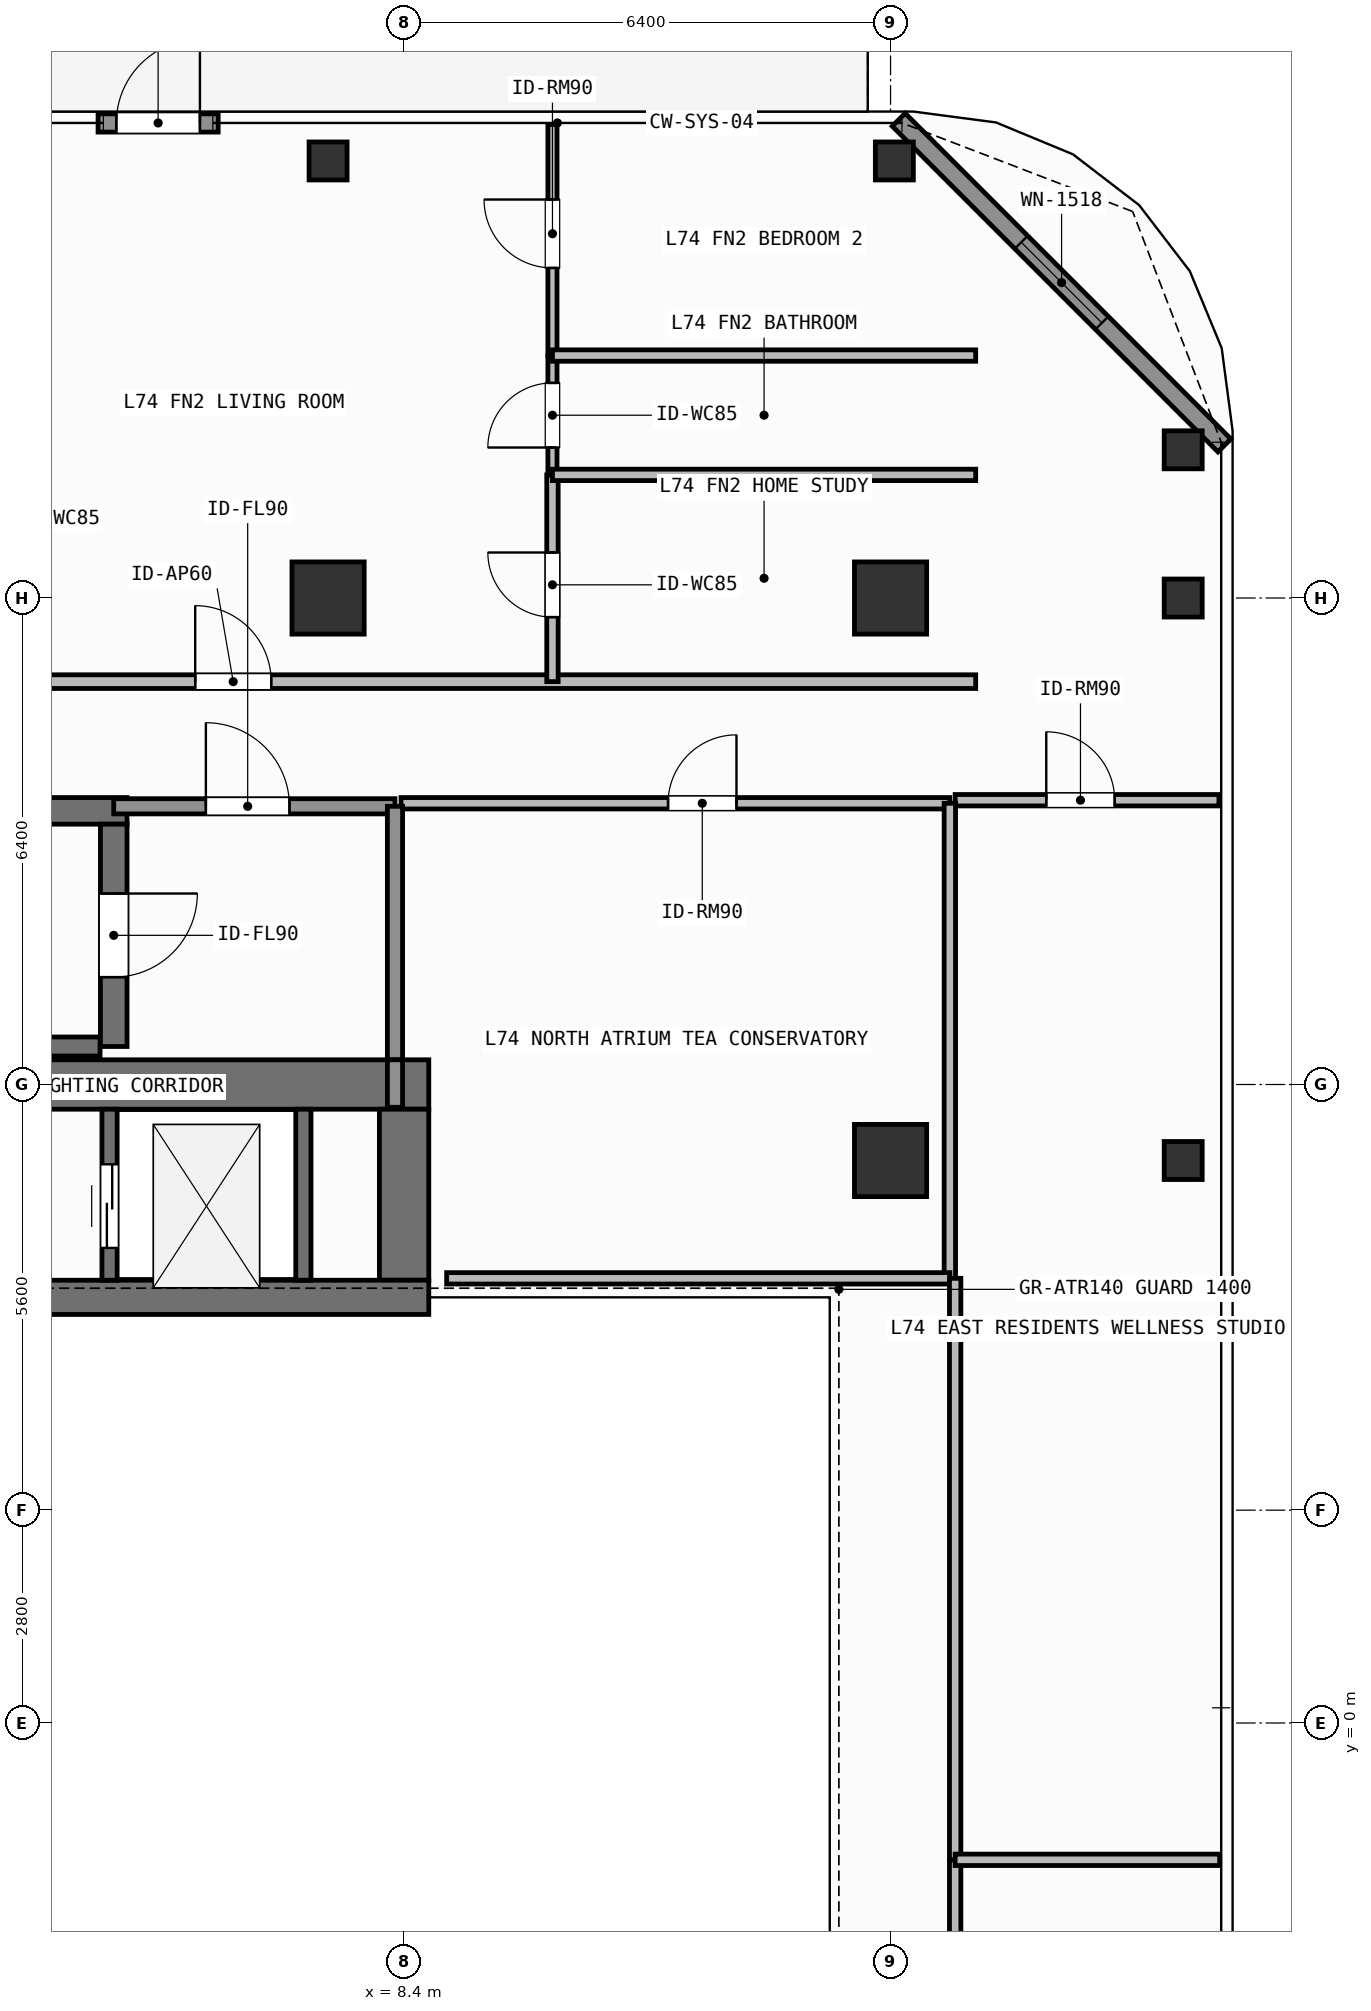
"""IFC4 building model, lengths in metres.
Left out: names, types, materials, properties, quantities, classifications, styles, units other than length and angle.
Written with IfcOpenShell. Run it as: python <this file> out.ifc"""

import sys

from ifc_helpers import new_model, si_unit, direction, frame, frame_2d, origin, origin_2d, place, context, subcontext, project, spatial, rectangle, hollow_rectangle, extrude, element, fill, save


model = new_model("IFC4")
c1 = context("Model", 3, precision=1e-05, world=origin(), true_north=direction((0.0, 1.0)))
c2 = subcontext(c1, "Body", "Model", "MODEL_VIEW")
j1 = project(units=[si_unit("LENGTHUNIT", "METRE"), si_unit("PLANEANGLEUNIT", "RADIAN")], contexts=[c1])
p1 = place(None, origin())
s1 = spatial("IfcSite", under=j1, at=p1, CompositionType="ELEMENT")
p2 = place(p1, origin())
s2 = spatial("IfcBuilding", under=s1, at=p2, CompositionType="ELEMENT")
p3 = place(p2, frame((0.0, 0.0, 301.5)))
s3 = spatial("IfcBuildingStorey", under=s2, at=p3, CompositionType="ELEMENT", Elevation=301.5)
p4 = place(p3, frame((-7.55, 8.4, 0.0), z_axis=(0.0, 0.0, 1.0), x_axis=(1.0, 0.0, 0.0)))
e1 = element("IfcWall", 1, at=p4, inside=s3, PredefinedType="SHEAR", context=c2, shape_type="SweptSolid", body=[
    extrude(rectangle(XDim=16.275, YDim=0.65, at=frame_2d((8.138, 0.0))), origin(), (0.0, 0.0, 1.0), 3.9),
])
p5 = place(p3, frame((8.4, 5.825, 0.0), z_axis=(0.0, 0.0, 1.0), x_axis=(0.0, 1.0, 0.0)))
e2 = element("IfcWall", 2, at=p5, inside=s3, PredefinedType="SHEAR", context=c2, shape_type="SweptSolid", body=[
    extrude(rectangle(XDim=2.25, YDim=0.65, at=frame_2d((1.125, 0.0))), origin(), (0.0, 0.0, 1.0), 3.9),
])
p6 = place(p3, frame((3.045, 5.6, 0.0), z_axis=(0.0, 0.0, 1.0), x_axis=(1.0, 0.0, 0.0)))
e3 = element("IfcWall", 3, at=p6, inside=s3, PredefinedType="SHEAR", context=c2, shape_type="SweptSolid", body=[
    extrude(rectangle(XDim=5.68, YDim=0.45, at=frame_2d((2.84, 0.0))), origin(), (0.0, 0.0, 1.0), 3.9),
])
p7 = place(p3, frame((-2.555, 12.0, 0.0), z_axis=(0.0, 0.0, 1.0), x_axis=(1.0, 0.0, 0.0)))
e4 = element("IfcWall", 4, at=p7, inside=s3, PredefinedType="SHEAR", context=c2, shape_type="SweptSolid", body=[
    extrude(rectangle(XDim=7.31, YDim=0.35, at=frame_2d((3.655, 0.0))), origin(), (0.0, 0.0, 1.0), 3.9),
])
p8 = place(p3, frame((-2.2, 8.9, 0.0), z_axis=(0.0, 0.0, 1.0), x_axis=(1.0, 0.0, 0.0)))
e5 = element("IfcWall", 5, at=p8, inside=s3, PredefinedType="SHEAR", context=c2, shape_type="SweptSolid", body=[
    extrude(rectangle(XDim=6.6, YDim=0.25, at=frame_2d((3.3, 0.0))), origin(), (0.0, 0.0, 1.0), 3.9),
])
p9 = place(p3, frame((4.58, 11.825, 0.0), z_axis=(0.0, 0.0, 1.0), x_axis=(0.0, -1.0, 0.0)))
e6 = element("IfcWall", 6, at=p9, inside=s3, PredefinedType="SHEAR", context=c2, shape_type="SweptSolid", body=[
    extrude(rectangle(XDim=2.925, YDim=0.35, at=frame_2d((1.462, 0.0))), origin(), (0.0, 0.0, 1.0), 3.9),
])
p10 = place(p9, frame((0.913, 0.0, 0.0)))
e7 = element("IfcOpeningElement", 7, at=p10, cuts=e6, PredefinedType="OPENING", context=c2, shape_type="SweptSolid", body=[
    extrude(rectangle(XDim=1.1, YDim=2.15, at=frame_2d((0.55, 1.075))), frame((0.0, 0.185, 0.0), z_axis=(0.0, -1.0, 0.0), x_axis=(1.0, 0.0, 0.0)), (0.0, 0.0, 1.0), 0.37),
])
for number, where, z_axis, x_axis in (
    (8, (7.4, 14.8, 0.0), (0.0, 0.0, 1.0), (1.0, 0.0, 0.0)),
    (9, (14.8, 14.8, 0.0), (0.0, 0.0, 1.0), (1.0, 0.0, 0.0)),
    (10, (14.8, 7.4, 0.0), (0.0, 0.0, 1.0), (1.0, 0.0, 0.0)),
):
    element("IfcColumn", number, at=place(p3, frame(where, z_axis=z_axis, x_axis=x_axis)), inside=s3, PredefinedType="COLUMN", context=c2, shape_type="SweptSolid", body=[
        extrude(rectangle(XDim=0.95, YDim=0.95, at=origin_2d()), origin(), (0.0, 0.0, 1.0), 3.9),
    ])
for number, where, z_axis, x_axis in (
    (11, (14.85, 20.55, 0.0), (0.0, 0.0, 1.0), (1.0, 0.0, 0.0)),
    (12, (18.65, 16.75, 0.0), (0.0, 0.0, 1.0), (1.0, 0.0, 0.0)),
    (13, (7.4, 20.55, 0.0), (0.0, 0.0, 1.0), (1.0, 0.0, 0.0)),
    (14, (18.65, 7.4, 0.0), (0.0, 0.0, 1.0), (1.0, 0.0, 0.0)),
    (15, (18.65, 14.8, 0.0), (0.0, 0.0, 1.0), (1.0, 0.0, 0.0)),
):
    element("IfcColumn", number, at=place(p3, frame(where, z_axis=z_axis, x_axis=x_axis)), inside=s3, PredefinedType="COLUMN", context=c2, shape_type="SweptSolid", body=[
        extrude(hollow_rectangle(XDim=0.5, YDim=0.5, WallThickness=0.025, at=origin_2d()), origin(), (0.0, 0.0, 1.0), 3.9),
    ])
p11 = place(p3, frame((4.374, 21.05, 0.0), z_axis=(0.0, 0.0, 1.0), x_axis=(1.0, 0.0, 0.0)))
e16 = element("IfcWall", 16, at=p11, inside=s3, PredefinedType="SOLIDWALL", context=c2, shape_type="SweptSolid", body=[
    extrude(rectangle(XDim=1.58, YDim=0.24, at=frame_2d((0.79, 0.0))), origin(), (0.0, 0.0, 1.0), 3.68),
])
p12 = place(p11, frame((0.24, 0.0, 0.0)))
e17 = element("IfcOpeningElement", 17, at=p12, cuts=e16, PredefinedType="OPENING", context=c2, shape_type="SweptSolid", body=[
    extrude(rectangle(XDim=1.1, YDim=2.2, at=frame_2d((0.55, 1.1))), frame((0.0, 0.13, 0.0), z_axis=(0.0, -1.0, 0.0), x_axis=(1.0, 0.0, 0.0)), (0.0, 0.0, 1.0), 0.26),
])
p13 = place(p3, frame((14.908, 21.092, 0.0), z_axis=(0.0, 0.0, 1.0), x_axis=(0.707106781187, -0.707106781187, 0.0)))
e18 = element("IfcWall", 18, at=p13, inside=s3, PredefinedType="SOLIDWALL", context=c2, shape_type="SweptSolid", body=[
    extrude(rectangle(XDim=6.059, YDim=0.24, at=frame_2d((3.03, 0.0))), origin(), (0.0, 0.0, 1.0), 3.68),
])
p14 = place(p13, frame((2.28, 0.0, 0.8)))
e19 = element("IfcOpeningElement", 19, at=p14, cuts=e18, PredefinedType="OPENING", context=c2, shape_type="SweptSolid", body=[
    extrude(rectangle(XDim=1.5, YDim=1.85, at=frame_2d((0.75, 0.925))), frame((0.0, 0.13, 0.0), z_axis=(0.0, -1.0, 0.0), x_axis=(1.0, 0.0, 0.0)), (0.0, 0.0, 1.0), 0.26),
])
p15 = place(p3, frame((4.525, 5.825, 0.0), z_axis=(0.0, 0.0, 1.0), x_axis=(0.0, 1.0, 0.0)))
e20 = element("IfcWall", 20, at=p15, inside=s3, PredefinedType="SHEAR", context=c2, shape_type="SweptSolid", body=[
    extrude(rectangle(XDim=2.25, YDim=0.2, at=frame_2d((1.125, 0.0))), origin(), (0.0, 0.0, 1.0), 3.68),
])
p16 = place(p15, frame((0.425, 0.0, 0.0)))
e21 = element("IfcOpeningElement", 21, at=p16, cuts=e20, PredefinedType="OPENING", context=c2, shape_type="SweptSolid", body=[
    extrude(rectangle(XDim=1.1, YDim=2.2, at=frame_2d((0.55, 1.1))), frame((0.0, 0.11, 0.0), z_axis=(0.0, -1.0, 0.0), x_axis=(1.0, 0.0, 0.0)), (0.0, 0.0, 1.0), 0.22),
])
p17 = place(p3, frame((7.075, 5.825, 0.0), z_axis=(0.0, 0.0, 1.0), x_axis=(0.0, 1.0, 0.0)))
e22 = element("IfcWall", 22, at=p17, inside=s3, PredefinedType="SHEAR", context=c2, shape_type="SweptSolid", body=[
    extrude(rectangle(XDim=2.25, YDim=0.2, at=frame_2d((1.125, 0.0))), origin(), (0.0, 0.0, 1.0), 3.68),
])
p18 = place(p3, frame((4.58, 12.06, 0.0), z_axis=(0.0, 0.0, 1.0), x_axis=(1.0, 0.0, 0.0)))
e23 = element("IfcWall", 23, at=p18, inside=s3, PredefinedType="SOLIDWALL", context=c2, shape_type="SweptSolid", body=[
    extrude(rectangle(XDim=3.7, YDim=0.2, at=frame_2d((1.85, 0.0))), origin(), (0.0, 0.0, 1.0), 3.68),
])
p19 = place(p18, frame((1.212, 0.0, 0.0)))
e24 = element("IfcOpeningElement", 24, at=p19, cuts=e23, PredefinedType="OPENING", context=c2, shape_type="SweptSolid", body=[
    extrude(rectangle(XDim=1.1, YDim=2.15, at=frame_2d((0.55, 1.075))), frame((0.0, 0.11, 0.0), z_axis=(0.0, -1.0, 0.0), x_axis=(1.0, 0.0, 0.0)), (0.0, 0.0, 1.0), 0.22),
])
p20 = place(p3, frame((8.36, 12.1, 0.0), z_axis=(0.0, 0.0, 1.0), x_axis=(1.0, 0.0, 0.0)))
e25 = element("IfcWall", 25, at=p20, inside=s3, PredefinedType="PARTITIONING", context=c2, shape_type="SweptSolid", body=[
    extrude(rectangle(XDim=7.22, YDim=0.15, at=frame_2d((3.61, 0.0))), origin(), (0.0, 0.0, 1.0), 3.68),
])
p21 = place(p20, frame((3.513, 0.0, 0.0)))
e26 = element("IfcOpeningElement", 26, at=p21, cuts=e25, PredefinedType="OPENING", context=c2, shape_type="SweptSolid", body=[
    extrude(rectangle(XDim=0.9, YDim=2.1, at=frame_2d((0.45, 1.05))), frame((0.0, 0.085, 0.0), z_axis=(0.0, -1.0, 0.0), x_axis=(1.0, 0.0, 0.0)), (0.0, 0.0, 1.0), 0.17),
])
p22 = place(p3, frame((-5.224, 13.7, 0.0), z_axis=(0.0, 0.0, 1.0), x_axis=(1.0, 0.0, 0.0)))
e27 = element("IfcWall", 27, at=p22, inside=s3, PredefinedType="PARTITIONING", context=c2, shape_type="SweptSolid", body=[
    extrude(rectangle(XDim=21.144, YDim=0.18, at=frame_2d((10.572, 0.0))), origin(), (0.0, 0.0, 1.0), 3.68),
])
p23 = place(p22, frame((10.876, 0.0, 0.0)))
e28 = element("IfcOpeningElement", 28, at=p23, cuts=e27, PredefinedType="OPENING", context=c2, shape_type="SweptSolid", body=[
    extrude(rectangle(XDim=1.0, YDim=2.2, at=frame_2d((0.5, 1.1))), frame((0.0, 0.1, 0.0), z_axis=(0.0, -1.0, 0.0), x_axis=(1.0, 0.0, 0.0)), (0.0, 0.0, 1.0), 0.2),
])
p24 = place(p3, frame((10.352, 13.7, 0.0), z_axis=(0.0, 0.0, 1.0), x_axis=(0.0, 1.0, 0.0)))
e29 = element("IfcWall", 29, at=p24, inside=s3, PredefinedType="PARTITIONING", context=c2, shape_type="SweptSolid", body=[
    extrude(rectangle(XDim=2.72, YDim=0.15, at=frame_2d((1.36, 0.0))), origin(), (0.0, 0.0, 1.0), 3.68),
])
p25 = place(p24, frame((0.849, 0.0, 0.0)))
e30 = element("IfcOpeningElement", 30, at=p25, cuts=e29, PredefinedType="OPENING", context=c2, shape_type="SweptSolid", body=[
    extrude(rectangle(XDim=0.85, YDim=2.1, at=frame_2d((0.425, 1.05))), frame((0.0, 0.085, 0.0), z_axis=(0.0, -1.0, 0.0), x_axis=(1.0, 0.0, 0.0)), (0.0, 0.0, 1.0), 0.17),
])
p26 = place(p3, frame((10.352, 16.42, 0.0), z_axis=(0.0, 0.0, 1.0), x_axis=(0.0, 1.0, 0.0)))
e31 = element("IfcWall", 31, at=p26, inside=s3, PredefinedType="PARTITIONING", context=c2, shape_type="SweptSolid", body=[
    extrude(rectangle(XDim=1.57, YDim=0.12, at=frame_2d((0.785, 0.0))), origin(), (0.0, 0.0, 1.0), 3.68),
])
p27 = place(p26, frame((0.36, 0.0, 0.0)))
e32 = element("IfcOpeningElement", 32, at=p27, cuts=e31, PredefinedType="OPENING", context=c2, shape_type="SweptSolid", body=[
    extrude(rectangle(XDim=0.85, YDim=2.1, at=frame_2d((0.425, 1.05))), frame((0.0, 0.07, 0.0), z_axis=(0.0, -1.0, 0.0), x_axis=(1.0, 0.0, 0.0)), (0.0, 0.0, 1.0), 0.14),
])
p28 = place(p3, frame((10.352, 17.99, 0.0), z_axis=(0.0, 0.0, 1.0), x_axis=(0.0, 1.0, 0.0)))
e33 = element("IfcWall", 33, at=p28, inside=s3, PredefinedType="PARTITIONING", context=c2, shape_type="SweptSolid", body=[
    extrude(rectangle(XDim=3.04, YDim=0.12, at=frame_2d((1.52, 0.0))), origin(), (0.0, 0.0, 1.0), 3.68),
])
p29 = place(p28, frame((1.153, 0.0, 0.0)))
e34 = element("IfcOpeningElement", 34, at=p29, cuts=e33, PredefinedType="OPENING", context=c2, shape_type="SweptSolid", body=[
    extrude(rectangle(XDim=0.9, YDim=2.1, at=frame_2d((0.45, 1.05))), frame((0.0, 0.07, 0.0), z_axis=(0.0, -1.0, 0.0), x_axis=(1.0, 0.0, 0.0)), (0.0, 0.0, 1.0), 0.14),
])
p30 = place(p3, frame((15.65, 12.14, 0.0), z_axis=(0.0, 0.0, 1.0), x_axis=(1.0, 0.0, 0.0)))
e35 = element("IfcWall", 35, at=p30, inside=s3, PredefinedType="PARTITIONING", context=c2, shape_type="SweptSolid", body=[
    extrude(rectangle(XDim=3.47, YDim=0.15, at=frame_2d((1.735, 0.0))), origin(), (0.0, 0.0, 1.0), 3.68),
])
p31 = place(p30, frame((1.198, 0.0, 0.0)))
e36 = element("IfcOpeningElement", 36, at=p31, cuts=e35, PredefinedType="OPENING", context=c2, shape_type="SweptSolid", body=[
    extrude(rectangle(XDim=0.9, YDim=2.1, at=frame_2d((0.45, 1.05))), frame((0.0, 0.085, 0.0), z_axis=(0.0, -1.0, 0.0), x_axis=(1.0, 0.0, 0.0)), (0.0, 0.0, 1.0), 0.17),
])
p32 = place(p3, frame((8.28, 8.725, 0.0), z_axis=(0.0, 0.0, 1.0), x_axis=(0.0, 1.0, 0.0)))
e37 = element("IfcWall", 37, at=p32, inside=s3, PredefinedType="SOLIDWALL", context=c2, shape_type="SweptSolid", body=[
    extrude(rectangle(XDim=3.335, YDim=0.2, at=frame_2d((1.667, 0.0))), origin(), (0.0, 0.0, 1.0), 3.68),
])
p33 = place(p3, frame((8.28, 8.1, 0.0), z_axis=(0.0, 0.0, 1.0), x_axis=(0.0, 1.0, 0.0)))
e38 = element("IfcWall", 38, at=p33, inside=s3, PredefinedType="SOLIDWALL", context=c2, shape_type="SweptSolid", body=[
    extrude(rectangle(XDim=0.625, YDim=0.2, at=frame_2d((0.312, 0.0))), origin(), (0.0, 0.0, 1.0), 3.68),
])
p34 = place(p3, frame((15.58, 5.85, 0.0), z_axis=(0.0, 0.0, 1.0), x_axis=(0.0, 1.0, 0.0)))
e39 = element("IfcWall", 39, at=p34, inside=s3, PredefinedType="PARTITIONING", context=c2, shape_type="SweptSolid", body=[
    extrude(rectangle(XDim=6.25, YDim=0.15, at=frame_2d((3.125, 0.0))), origin(), (0.0, 0.0, 1.0), 3.68),
])
p35 = place(p3, frame((8.96, 5.85, 0.0), z_axis=(0.0, 0.0, 1.0), x_axis=(1.0, 0.0, 0.0)))
e40 = element("IfcWall", 40, at=p35, inside=s3, PredefinedType="PARTITIONING", context=c2, shape_type="SweptSolid", body=[
    extrude(rectangle(XDim=6.62, YDim=0.15, at=frame_2d((3.31, 0.0))), origin(), (0.0, 0.0, 1.0), 3.68),
])
for number, where, z_axis, x_axis in (
    (41, (10.352, 16.42, 0.0), (0.0, 0.0, 1.0), (1.0, 0.0, 0.0)),
    (42, (10.352, 17.99, 0.0), (0.0, 0.0, 1.0), (1.0, 0.0, 0.0)),
):
    element("IfcWall", number, at=place(p3, frame(where, z_axis=z_axis, x_axis=x_axis)), inside=s3, PredefinedType="PARTITIONING", context=c2, shape_type="SweptSolid", body=[
        extrude(rectangle(XDim=5.568, YDim=0.15, at=frame_2d((2.784, 0.0))), origin(), (0.0, 0.0, 1.0), 3.68),
    ])
p36 = place(p3, frame((15.65, -5.85, 0.0), z_axis=(0.0, 0.0, 1.0), x_axis=(0.0, 1.0, 0.0)))
e43 = element("IfcWall", 43, at=p36, inside=s3, PredefinedType="PARTITIONING", context=c2, shape_type="SweptSolid", body=[
    extrude(rectangle(XDim=4.05, YDim=0.15, at=frame_2d((2.025, 0.0))), origin(), (0.0, 0.0, 1.0), 3.68),
])
p37 = place(p3, frame((15.65, -1.8, 0.0), z_axis=(0.0, 0.0, 1.0), x_axis=(0.0, 1.0, 0.0)))
e44 = element("IfcWall", 44, at=p37, inside=s3, PredefinedType="PARTITIONING", context=c2, shape_type="SweptSolid", body=[
    extrude(rectangle(XDim=7.65, YDim=0.15, at=frame_2d((3.825, 0.0))), origin(), (0.0, 0.0, 1.0), 3.68),
])
p38 = place(p3, frame((15.65, -1.8, 0.0), z_axis=(0.0, 0.0, 1.0), x_axis=(1.0, 0.0, 0.0)))
e45 = element("IfcWall", 45, at=p38, inside=s3, PredefinedType="PARTITIONING", context=c2, shape_type="SweptSolid", body=[
    extrude(rectangle(XDim=3.48, YDim=0.15, at=frame_2d((1.74, 0.0))), origin(), (0.0, 0.0, 1.0), 3.68),
])
p39 = place(p12, origin())
e46 = element("IfcDoor", 46, at=p39, inside=s3, OperationType="SINGLE_SWING_RIGHT", PredefinedType="DOOR", context=c2, shape_type="SweptSolid", body=[
    extrude(rectangle(XDim=1.1, YDim=2.2, at=frame_2d((0.55, 1.1))), frame((0.0, 0.025, 0.0), z_axis=(0.0, -1.0, 0.0), x_axis=(1.0, 0.0, 0.0)), (0.0, 0.0, 1.0), 0.05),
])
fill(e17, e46)
p40 = place(p14, origin())
e47 = element("IfcWindow", 47, at=p40, inside=s3, PartitioningType="SINGLE_PANEL", PredefinedType="WINDOW", context=c2, shape_type="SweptSolid", body=[
    extrude(rectangle(XDim=1.5, YDim=1.85, at=frame_2d((0.75, 0.925))), frame((0.0, 0.03, 0.0), z_axis=(0.0, -1.0, 0.0), x_axis=(1.0, 0.0, 0.0)), (0.0, 0.0, 1.0), 0.06),
])
fill(e19, e47)
p41 = place(p16, origin())
e48 = element("IfcDoor", 48, at=p41, inside=s3, OperationType="SLIDING_TO_LEFT", PredefinedType="DOOR", context=c2, shape_type="SweptSolid", body=[
    extrude(rectangle(XDim=1.1, YDim=2.2, at=frame_2d((0.55, 1.1))), frame((0.0, 0.025, 0.0), z_axis=(0.0, -1.0, 0.0), x_axis=(1.0, 0.0, 0.0)), (0.0, 0.0, 1.0), 0.05),
])
fill(e21, e48)
p42 = place(p10, origin())
e49 = element("IfcDoor", 49, at=p42, inside=s3, OperationType="SINGLE_SWING_LEFT", PredefinedType="DOOR", context=c2, shape_type="SweptSolid", body=[
    extrude(rectangle(XDim=1.1, YDim=2.15, at=frame_2d((0.55, 1.075))), frame((0.0, 0.025, 0.0), z_axis=(0.0, -1.0, 0.0), x_axis=(1.0, 0.0, 0.0)), (0.0, 0.0, 1.0), 0.05),
])
fill(e7, e49)
p43 = place(p19, origin())
e50 = element("IfcDoor", 50, at=p43, inside=s3, OperationType="SINGLE_SWING_LEFT", PredefinedType="DOOR", context=c2, shape_type="SweptSolid", body=[
    extrude(rectangle(XDim=1.1, YDim=2.15, at=frame_2d((0.55, 1.075))), frame((0.0, 0.025, 0.0), z_axis=(0.0, -1.0, 0.0), x_axis=(1.0, 0.0, 0.0)), (0.0, 0.0, 1.0), 0.05),
])
fill(e24, e50)
p44 = place(p21, origin())
e51 = element("IfcDoor", 51, at=p44, inside=s3, OperationType="SINGLE_SWING_RIGHT", PredefinedType="DOOR", context=c2, shape_type="SweptSolid", body=[
    extrude(rectangle(XDim=0.9, YDim=2.1, at=frame_2d((0.45, 1.05))), frame((0.0, 0.025, 0.0), z_axis=(0.0, -1.0, 0.0), x_axis=(1.0, 0.0, 0.0)), (0.0, 0.0, 1.0), 0.05),
])
fill(e26, e51)
p45 = place(p23, origin())
e52 = element("IfcDoor", 52, at=p45, inside=s3, OperationType="SINGLE_SWING_LEFT", PredefinedType="DOOR", context=c2, shape_type="SweptSolid", body=[
    extrude(rectangle(XDim=1.0, YDim=2.2, at=frame_2d((0.5, 1.1))), frame((0.0, 0.025, 0.0), z_axis=(0.0, -1.0, 0.0), x_axis=(1.0, 0.0, 0.0)), (0.0, 0.0, 1.0), 0.05),
])
fill(e28, e52)
p46 = place(p25, origin())
e53 = element("IfcDoor", 53, at=p46, inside=s3, OperationType="SINGLE_SWING_RIGHT", PredefinedType="DOOR", context=c2, shape_type="SweptSolid", body=[
    extrude(rectangle(XDim=0.85, YDim=2.1, at=frame_2d((0.425, 1.05))), frame((0.0, 0.025, 0.0), z_axis=(0.0, -1.0, 0.0), x_axis=(1.0, 0.0, 0.0)), (0.0, 0.0, 1.0), 0.05),
])
fill(e30, e53)
p47 = place(p27, origin())
e54 = element("IfcDoor", 54, at=p47, inside=s3, OperationType="SINGLE_SWING_LEFT", PredefinedType="DOOR", context=c2, shape_type="SweptSolid", body=[
    extrude(rectangle(XDim=0.85, YDim=2.1, at=frame_2d((0.425, 1.05))), frame((0.0, 0.025, 0.0), z_axis=(0.0, -1.0, 0.0), x_axis=(1.0, 0.0, 0.0)), (0.0, 0.0, 1.0), 0.05),
])
fill(e32, e54)
p48 = place(p29, origin())
e55 = element("IfcDoor", 55, at=p48, inside=s3, OperationType="SINGLE_SWING_RIGHT", PredefinedType="DOOR", context=c2, shape_type="SweptSolid", body=[
    extrude(rectangle(XDim=0.9, YDim=2.1, at=frame_2d((0.45, 1.05))), frame((0.0, 0.025, 0.0), z_axis=(0.0, -1.0, 0.0), x_axis=(1.0, 0.0, 0.0)), (0.0, 0.0, 1.0), 0.05),
])
fill(e34, e55)
p49 = place(p31, origin())
e56 = element("IfcDoor", 56, at=p49, inside=s3, OperationType="SINGLE_SWING_LEFT", PredefinedType="DOOR", context=c2, shape_type="SweptSolid", body=[
    extrude(rectangle(XDim=0.9, YDim=2.1, at=frame_2d((0.45, 1.05))), frame((0.0, 0.025, 0.0), z_axis=(0.0, -1.0, 0.0), x_axis=(1.0, 0.0, 0.0)), (0.0, 0.0, 1.0), 0.05),
])
fill(e36, e56)
save(model, sys.argv[1])
